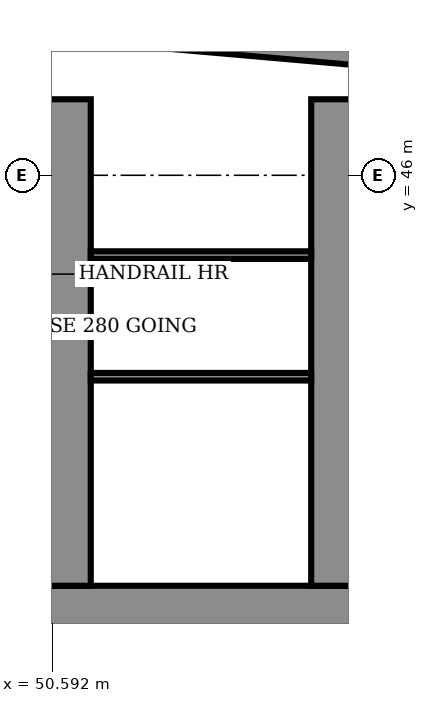
"""IFC4 building model, lengths in metres.
Left out: names, types, materials, properties, quantities, classifications, styles, units other than length and angle.
Written with IfcOpenShell. Run it as: python <this file> out.ifc"""

import sys

from ifc_helpers import new_model, si_unit, direction, frame, frame_2d, origin, place, context, subcontext, project, spatial, polyline, rectangle, outline, extrude, element, fill, save


model = new_model("IFC4")
c1 = context("Model", 3, precision=1e-05, world=origin(), true_north=direction((0.0, 1.0)))
c2 = subcontext(c1, "Body", "Model", "MODEL_VIEW")
j1 = project(units=[si_unit("LENGTHUNIT", "METRE"), si_unit("PLANEANGLEUNIT", "RADIAN")], contexts=[c1])
p1 = place(None, origin())
s1 = spatial("IfcSite", under=j1, at=p1, CompositionType="ELEMENT")
p2 = place(p1, origin())
s2 = spatial("IfcBuilding", under=s1, at=p2, CompositionType="ELEMENT")
p3 = place(p2, origin())
s3 = spatial("IfcBuildingStorey", under=s2, at=p3, CompositionType="ELEMENT", Elevation=0.0)
p4 = place(p3, frame((59.301, 49.06, 0.0), z_axis=(0.0, 0.0, 1.0), x_axis=(-0.996195, 0.087145, 0.0)))
e1 = element("IfcWall", 1, at=p4, inside=s3, PredefinedType="SOLIDWALL", context=c2, shape_type="SweptSolid", body=[
    extrude(rectangle(XDim=11.344, YDim=0.45, at=frame_2d((5.672, 0.0))), origin(), (0.0, 0.0, 1.0), 7.7),
])
p5 = place(p3, frame((9.0, 34.6, 0.0), z_axis=(0.0, 0.0, 1.0), x_axis=(1.0, 0.0, 0.0)))
e2 = element("IfcWall", 2, at=p5, inside=s3, PredefinedType="SHEAR", context=c2, shape_type="SweptSolid", body=[
    extrude(rectangle(XDim=56.0, YDim=1.2, at=frame_2d((28.0, 0.0))), origin(), (0.0, 0.0, 1.0), 7.7),
])
p6 = place(p5, frame((3.3, 0.0, 0.0)))
e3 = element("IfcOpeningElement", 3, at=p6, cuts=e2, PredefinedType="OPENING", context=c2, shape_type="SweptSolid", body=[
    extrude(rectangle(XDim=1.0, YDim=2.1, at=frame_2d((0.5, 1.05))), frame((0.0, 0.61, 0.0), z_axis=(0.0, -1.0, 0.0), x_axis=(1.0, 0.0, 0.0)), (0.0, 0.0, 1.0), 1.22),
])
p7 = place(p5, frame((7.867, 0.0, 0.0)))
e4 = element("IfcOpeningElement", 4, at=p7, cuts=e2, PredefinedType="OPENING", context=c2, shape_type="SweptSolid", body=[
    extrude(rectangle(XDim=1.1, YDim=2.1, at=frame_2d((0.55, 1.05))), frame((0.0, 0.61, 0.0), z_axis=(0.0, -1.0, 0.0), x_axis=(1.0, 0.0, 0.0)), (0.0, 0.0, 1.0), 1.22),
])
p8 = place(p5, frame((12.033, 0.0, 0.0)))
e5 = element("IfcOpeningElement", 5, at=p8, cuts=e2, PredefinedType="OPENING", context=c2, shape_type="SweptSolid", body=[
    extrude(rectangle(XDim=1.1, YDim=2.1, at=frame_2d((0.55, 1.05))), frame((0.0, 0.61, 0.0), z_axis=(0.0, -1.0, 0.0), x_axis=(1.0, 0.0, 0.0)), (0.0, 0.0, 1.0), 1.22),
])
p9 = place(p5, frame((9.8, 0.0, 0.0)))
e6 = element("IfcOpeningElement", 6, at=p9, cuts=e2, PredefinedType="OPENING", context=c2, shape_type="SweptSolid", body=[
    extrude(rectangle(XDim=1.4, YDim=2.1, at=frame_2d((0.7, 1.05))), frame((0.0, 0.61, 0.0), z_axis=(0.0, -1.0, 0.0), x_axis=(1.0, 0.0, 0.0)), (0.0, 0.0, 1.0), 1.22),
])
p10 = place(p5, frame((14.65, 0.0, 0.0)))
e7 = element("IfcOpeningElement", 7, at=p10, cuts=e2, PredefinedType="OPENING", context=c2, shape_type="SweptSolid", body=[
    extrude(rectangle(XDim=1.2, YDim=2.1, at=frame_2d((0.6, 1.05))), frame((0.0, 0.61, 0.0), z_axis=(0.0, -1.0, 0.0), x_axis=(1.0, 0.0, 0.0)), (0.0, 0.0, 1.0), 1.22),
])
p11 = place(p5, frame((21.867, 0.0, 0.0)))
e8 = element("IfcOpeningElement", 8, at=p11, cuts=e2, PredefinedType="OPENING", context=c2, shape_type="SweptSolid", body=[
    extrude(rectangle(XDim=1.1, YDim=2.1, at=frame_2d((0.55, 1.05))), frame((0.0, 0.61, 0.0), z_axis=(0.0, -1.0, 0.0), x_axis=(1.0, 0.0, 0.0)), (0.0, 0.0, 1.0), 1.22),
])
p12 = place(p5, frame((26.033, 0.0, 0.0)))
e9 = element("IfcOpeningElement", 9, at=p12, cuts=e2, PredefinedType="OPENING", context=c2, shape_type="SweptSolid", body=[
    extrude(rectangle(XDim=1.1, YDim=2.1, at=frame_2d((0.55, 1.05))), frame((0.0, 0.61, 0.0), z_axis=(0.0, -1.0, 0.0), x_axis=(1.0, 0.0, 0.0)), (0.0, 0.0, 1.0), 1.22),
])
p13 = place(p5, frame((23.8, 0.0, 0.0)))
e10 = element("IfcOpeningElement", 10, at=p13, cuts=e2, PredefinedType="OPENING", context=c2, shape_type="SweptSolid", body=[
    extrude(rectangle(XDim=1.4, YDim=2.1, at=frame_2d((0.7, 1.05))), frame((0.0, 0.61, 0.0), z_axis=(0.0, -1.0, 0.0), x_axis=(1.0, 0.0, 0.0)), (0.0, 0.0, 1.0), 1.22),
])
p14 = place(p5, frame((28.867, 0.0, 0.0)))
e11 = element("IfcOpeningElement", 11, at=p14, cuts=e2, PredefinedType="OPENING", context=c2, shape_type="SweptSolid", body=[
    extrude(rectangle(XDim=1.1, YDim=2.1, at=frame_2d((0.55, 1.05))), frame((0.0, 0.61, 0.0), z_axis=(0.0, -1.0, 0.0), x_axis=(1.0, 0.0, 0.0)), (0.0, 0.0, 1.0), 1.22),
])
p15 = place(p5, frame((33.033, 0.0, 0.0)))
e12 = element("IfcOpeningElement", 12, at=p15, cuts=e2, PredefinedType="OPENING", context=c2, shape_type="SweptSolid", body=[
    extrude(rectangle(XDim=1.1, YDim=2.1, at=frame_2d((0.55, 1.05))), frame((0.0, 0.61, 0.0), z_axis=(0.0, -1.0, 0.0), x_axis=(1.0, 0.0, 0.0)), (0.0, 0.0, 1.0), 1.22),
])
p16 = place(p5, frame((40.15, 0.0, 0.0)))
e13 = element("IfcOpeningElement", 13, at=p16, cuts=e2, PredefinedType="OPENING", context=c2, shape_type="SweptSolid", body=[
    extrude(rectangle(XDim=1.2, YDim=2.1, at=frame_2d((0.6, 1.05))), frame((0.0, 0.61, 0.0), z_axis=(0.0, -1.0, 0.0), x_axis=(1.0, 0.0, 0.0)), (0.0, 0.0, 1.0), 1.22),
])
p17 = place(p5, frame((42.867, 0.0, 0.0)))
e14 = element("IfcOpeningElement", 14, at=p17, cuts=e2, PredefinedType="OPENING", context=c2, shape_type="SweptSolid", body=[
    extrude(rectangle(XDim=1.1, YDim=2.1, at=frame_2d((0.55, 1.05))), frame((0.0, 0.61, 0.0), z_axis=(0.0, -1.0, 0.0), x_axis=(1.0, 0.0, 0.0)), (0.0, 0.0, 1.0), 1.22),
])
p18 = place(p5, frame((47.033, 0.0, 0.0)))
e15 = element("IfcOpeningElement", 15, at=p18, cuts=e2, PredefinedType="OPENING", context=c2, shape_type="SweptSolid", body=[
    extrude(rectangle(XDim=1.1, YDim=2.1, at=frame_2d((0.55, 1.05))), frame((0.0, 0.61, 0.0), z_axis=(0.0, -1.0, 0.0), x_axis=(1.0, 0.0, 0.0)), (0.0, 0.0, 1.0), 1.22),
])
p19 = place(p5, frame((44.8, 0.0, 0.0)))
e16 = element("IfcOpeningElement", 16, at=p19, cuts=e2, PredefinedType="OPENING", context=c2, shape_type="SweptSolid", body=[
    extrude(rectangle(XDim=1.4, YDim=2.1, at=frame_2d((0.7, 1.05))), frame((0.0, 0.61, 0.0), z_axis=(0.0, -1.0, 0.0), x_axis=(1.0, 0.0, 0.0)), (0.0, 0.0, 1.0), 1.22),
])
p20 = place(p5, frame((49.867, 0.0, 0.0)))
e17 = element("IfcOpeningElement", 17, at=p20, cuts=e2, PredefinedType="OPENING", context=c2, shape_type="SweptSolid", body=[
    extrude(rectangle(XDim=1.1, YDim=2.1, at=frame_2d((0.55, 1.05))), frame((0.0, 0.61, 0.0), z_axis=(0.0, -1.0, 0.0), x_axis=(1.0, 0.0, 0.0)), (0.0, 0.0, 1.0), 1.22),
])
p21 = place(p5, frame((53.5, 0.0, 0.0)))
e18 = element("IfcOpeningElement", 18, at=p21, cuts=e2, PredefinedType="OPENING", context=c2, shape_type="SweptSolid", body=[
    extrude(rectangle(XDim=1.1, YDim=2.1, at=frame_2d((0.55, 1.05))), frame((0.0, 0.61, 0.0), z_axis=(0.0, -1.0, 0.0), x_axis=(1.0, 0.0, 0.0)), (0.0, 0.0, 1.0), 1.22),
])
p22 = place(p5, frame((51.567, 0.0, 0.0)))
e19 = element("IfcOpeningElement", 19, at=p22, cuts=e2, PredefinedType="OPENING", context=c2, shape_type="SweptSolid", body=[
    extrude(rectangle(XDim=1.4, YDim=2.1, at=frame_2d((0.7, 1.05))), frame((0.0, 0.61, 0.0), z_axis=(0.0, -1.0, 0.0), x_axis=(1.0, 0.0, 0.0)), (0.0, 0.0, 1.0), 1.22),
])
p23 = place(p3, frame((51.0, 35.2, 0.0), z_axis=(0.0, 0.0, 1.0), x_axis=(0.0, 1.0, 0.0)))
e20 = element("IfcWall", 20, at=p23, inside=s3, PredefinedType="SHEAR", context=c2, shape_type="SweptSolid", body=[
    extrude(rectangle(XDim=12.8, YDim=1.2, at=frame_2d((6.4, 0.0))), origin(), (0.0, 0.0, 1.0), 7.7),
])
p24 = place(p23, frame((3.2, 0.0, 0.0)))
e21 = element("IfcOpeningElement", 21, at=p24, cuts=e20, PredefinedType="OPENING", context=c2, shape_type="SweptSolid", body=[
    extrude(rectangle(XDim=1.1, YDim=2.1, at=frame_2d((0.55, 1.05))), frame((0.0, 0.61, 0.0), z_axis=(0.0, -1.0, 0.0), x_axis=(1.0, 0.0, 0.0)), (0.0, 0.0, 1.0), 1.22),
])
p25 = place(p3, frame((58.0, 35.2, 0.0), z_axis=(0.0, 0.0, 1.0), x_axis=(0.0, 1.0, 0.0)))
e22 = element("IfcWall", 22, at=p25, inside=s3, PredefinedType="SHEAR", context=c2, shape_type="SweptSolid", body=[
    extrude(rectangle(XDim=12.8, YDim=1.2, at=frame_2d((6.4, 0.0))), origin(), (0.0, 0.0, 1.0), 7.7),
])
p26 = place(p25, frame((10.134, 0.0, 0.0)))
e23 = element("IfcOpeningElement", 23, at=p26, cuts=e22, PredefinedType="OPENING", context=c2, shape_type="SweptSolid", body=[
    extrude(rectangle(XDim=1.0, YDim=2.1, at=frame_2d((0.5, 1.05))), frame((0.0, 0.61, 0.0), z_axis=(0.0, -1.0, 0.0), x_axis=(1.0, 0.0, 0.0)), (0.0, 0.0, 1.0), 1.22),
])
p27 = place(p25, frame((3.2, 0.0, 0.0)))
e24 = element("IfcOpeningElement", 24, at=p27, cuts=e22, PredefinedType="OPENING", context=c2, shape_type="SweptSolid", body=[
    extrude(rectangle(XDim=1.1, YDim=2.1, at=frame_2d((0.55, 1.05))), frame((0.0, 0.61, 0.0), z_axis=(0.0, -1.0, 0.0), x_axis=(1.0, 0.0, 0.0)), (0.0, 0.0, 1.0), 1.22),
])
p28 = place(p3, frame((51.6, 40.7, 0.0), z_axis=(0.0, 0.0, 1.0), x_axis=(1.0, 0.0, 0.0)))
e25 = element("IfcWall", 25, at=p28, inside=s3, PredefinedType="PARTITIONING", context=c2, shape_type="SweptSolid", body=[
    extrude(rectangle(XDim=5.8, YDim=0.2, at=frame_2d((2.9, 0.0))), origin(), (0.0, 0.0, 1.0), 7.7),
])
p29 = place(p28, frame((0.317, 0.0, 0.0)))
e26 = element("IfcOpeningElement", 26, at=p29, cuts=e25, PredefinedType="OPENING", context=c2, shape_type="SweptSolid", body=[
    extrude(rectangle(XDim=1.0, YDim=2.1, at=frame_2d((0.5, 1.05))), frame((0.0, 0.11, 0.0), z_axis=(0.0, -1.0, 0.0), x_axis=(1.0, 0.0, 0.0)), (0.0, 0.0, 1.0), 0.22),
])
p30 = place(p28, frame((2.35, 0.0, 0.0)))
e27 = element("IfcOpeningElement", 27, at=p30, cuts=e25, PredefinedType="OPENING", context=c2, shape_type="SweptSolid", body=[
    extrude(rectangle(XDim=1.1, YDim=2.1, at=frame_2d((0.55, 1.05))), frame((0.0, 0.11, 0.0), z_axis=(0.0, -1.0, 0.0), x_axis=(1.0, 0.0, 0.0)), (0.0, 0.0, 1.0), 0.22),
])
p31 = place(p28, frame((4.433, 0.0, 0.0)))
e28 = element("IfcOpeningElement", 28, at=p31, cuts=e25, PredefinedType="OPENING", context=c2, shape_type="SweptSolid", body=[
    extrude(rectangle(XDim=1.1, YDim=2.1, at=frame_2d((0.55, 1.05))), frame((0.0, 0.11, 0.0), z_axis=(0.0, -1.0, 0.0), x_axis=(1.0, 0.0, 0.0)), (0.0, 0.0, 1.0), 0.22),
])
p32 = place(p3, frame((51.6, 43.9, 0.0), z_axis=(0.0, 0.0, 1.0), x_axis=(1.0, 0.0, 0.0)))
e29 = element("IfcWall", 29, at=p32, inside=s3, PredefinedType="PARTITIONING", context=c2, shape_type="SweptSolid", body=[
    extrude(rectangle(XDim=5.8, YDim=0.2, at=frame_2d((2.9, 0.0))), origin(), (0.0, 0.0, 1.0), 7.7),
])
p33 = place(p32, frame((0.317, 0.0, 0.0)))
e30 = element("IfcOpeningElement", 30, at=p33, cuts=e29, PredefinedType="OPENING", context=c2, shape_type="SweptSolid", body=[
    extrude(rectangle(XDim=1.0, YDim=2.1, at=frame_2d((0.5, 1.05))), frame((0.0, 0.11, 0.0), z_axis=(0.0, -1.0, 0.0), x_axis=(1.0, 0.0, 0.0)), (0.0, 0.0, 1.0), 0.22),
])
p34 = place(p3, frame((0.0, 0.0, -0.0)))
e31 = element("IfcWall", 31, at=p34, inside=s3, PredefinedType="PARTITIONING", context=c2, shape_type="SweptSolid", body=[
    extrude(outline(polyline([(53.233, 37.15), (51.6, 37.15), (51.6, 37.35), (53.233, 37.35), (53.433, 37.35), (53.433, 35.2), (53.233, 35.2), (53.233, 37.15)])), origin(), (0.0, 0.0, 1.0), 7.7),
])
p35 = place(p3, frame((0.0, 0.0, -0.0)))
e32 = element("IfcWall", 32, at=p35, inside=s3, PredefinedType="PARTITIONING", context=c2, shape_type="SweptSolid", body=[
    extrude(outline(polyline([(55.567, 37.35), (55.767, 37.35), (57.4, 37.35), (57.4, 37.15), (55.767, 37.15), (55.767, 35.2), (55.567, 35.2), (55.567, 37.35)])), origin(), (0.0, 0.0, 1.0), 7.7),
])
p36 = place(p3, frame((0.0, 0.0, -0.0)))
e33 = element("IfcWall", 33, at=p36, inside=s3, PredefinedType="PARTITIONING", context=c2, shape_type="SweptSolid", body=[
    extrude(outline(polyline([(53.233, 40.8), (53.233, 43.8), (53.433, 43.8), (53.433, 40.8), (53.233, 40.8)])), origin(), (0.0, 0.0, 1.0), 7.7),
])
p37 = place(p3, frame((0.0, 0.0, -0.0)))
e34 = element("IfcWall", 34, at=p37, inside=s3, PredefinedType="PARTITIONING", context=c2, shape_type="SweptSolid", body=[
    extrude(outline(polyline([(55.567, 40.8), (55.567, 43.8), (55.767, 43.8), (55.767, 40.8), (55.567, 40.8)])), origin(), (0.0, 0.0, 1.0), 7.7),
])
p38 = place(p17, origin())
e35 = element("IfcDoor", 35, at=p38, inside=s3, OperationType="DOUBLE_DOOR_SLIDING", PredefinedType="DOOR", context=c2, shape_type="SweptSolid", body=[
    extrude(rectangle(XDim=1.1, YDim=2.1, at=frame_2d((0.55, 1.05))), frame((0.0, 0.025, 0.0), z_axis=(0.0, -1.0, 0.0), x_axis=(1.0, 0.0, 0.0)), (0.0, 0.0, 1.0), 0.05),
])
fill(e14, e35)
p39 = place(p18, origin())
e36 = element("IfcDoor", 36, at=p39, inside=s3, OperationType="DOUBLE_DOOR_SLIDING", PredefinedType="DOOR", context=c2, shape_type="SweptSolid", body=[
    extrude(rectangle(XDim=1.1, YDim=2.1, at=frame_2d((0.55, 1.05))), frame((0.0, 0.025, 0.0), z_axis=(0.0, -1.0, 0.0), x_axis=(1.0, 0.0, 0.0)), (0.0, 0.0, 1.0), 0.05),
])
fill(e15, e36)
p40 = place(p19, origin())
e37 = element("IfcDoor", 37, at=p40, inside=s3, OperationType="DOUBLE_DOOR_SINGLE_SWING", PredefinedType="DOOR", context=c2, shape_type="SweptSolid", body=[
    extrude(rectangle(XDim=1.4, YDim=2.1, at=frame_2d((0.7, 1.05))), frame((0.0, 0.025, 0.0), z_axis=(0.0, -1.0, 0.0), x_axis=(1.0, 0.0, 0.0)), (0.0, 0.0, 1.0), 0.05),
])
fill(e16, e37)
p41 = place(p29, origin())
e38 = element("IfcDoor", 38, at=p41, inside=s3, OperationType="SINGLE_SWING_RIGHT", PredefinedType="DOOR", context=c2, shape_type="SweptSolid", body=[
    extrude(rectangle(XDim=1.0, YDim=2.1, at=frame_2d((0.5, 1.05))), frame((0.0, 0.025, 0.0), z_axis=(0.0, -1.0, 0.0), x_axis=(1.0, 0.0, 0.0)), (0.0, 0.0, 1.0), 0.05),
])
fill(e26, e38)
p42 = place(p30, origin())
e39 = element("IfcDoor", 39, at=p42, inside=s3, OperationType="DOUBLE_DOOR_SLIDING", PredefinedType="DOOR", context=c2, shape_type="SweptSolid", body=[
    extrude(rectangle(XDim=1.1, YDim=2.1, at=frame_2d((0.55, 1.05))), frame((0.0, 0.025, 0.0), z_axis=(0.0, -1.0, 0.0), x_axis=(1.0, 0.0, 0.0)), (0.0, 0.0, 1.0), 0.05),
])
fill(e27, e39)
p43 = place(p31, origin())
e40 = element("IfcDoor", 40, at=p43, inside=s3, OperationType="DOUBLE_DOOR_SLIDING", PredefinedType="DOOR", context=c2, shape_type="SweptSolid", body=[
    extrude(rectangle(XDim=1.1, YDim=2.1, at=frame_2d((0.55, 1.05))), frame((0.0, 0.025, 0.0), z_axis=(0.0, -1.0, 0.0), x_axis=(1.0, 0.0, 0.0)), (0.0, 0.0, 1.0), 0.05),
])
fill(e28, e40)
p44 = place(p33, origin())
e41 = element("IfcDoor", 41, at=p44, inside=s3, OperationType="SINGLE_SWING_LEFT", PredefinedType="DOOR", context=c2, shape_type="SweptSolid", body=[
    extrude(rectangle(XDim=1.0, YDim=2.1, at=frame_2d((0.5, 1.05))), frame((0.0, 0.025, 0.0), z_axis=(0.0, -1.0, 0.0), x_axis=(1.0, 0.0, 0.0)), (0.0, 0.0, 1.0), 0.05),
])
fill(e30, e41)
p45 = place(p26, origin())
e42 = element("IfcDoor", 42, at=p45, inside=s3, OperationType="SINGLE_SWING_LEFT", PredefinedType="DOOR", context=c2, shape_type="SweptSolid", body=[
    extrude(rectangle(XDim=1.0, YDim=2.1, at=frame_2d((0.5, 1.05))), frame((0.0, 0.6, 0.0), z_axis=(0.0, -1.0, 0.0), x_axis=(1.0, 0.0, 0.0)), (0.0, 0.0, 1.0), 1.199),
])
fill(e23, e42)
p46 = place(p24, origin())
e43 = element("IfcDoor", 43, at=p46, inside=s3, OperationType="SINGLE_SWING_RIGHT", PredefinedType="DOOR", context=c2, shape_type="SweptSolid", body=[
    extrude(rectangle(XDim=1.1, YDim=2.1, at=frame_2d((0.55, 1.05))), frame((0.0, 0.025, 0.0), z_axis=(0.0, -1.0, 0.0), x_axis=(1.0, 0.0, 0.0)), (0.0, 0.0, 1.0), 0.05),
])
fill(e21, e43)
p47 = place(p27, origin())
e44 = element("IfcDoor", 44, at=p47, inside=s3, OperationType="SINGLE_SWING_LEFT", PredefinedType="DOOR", context=c2, shape_type="SweptSolid", body=[
    extrude(rectangle(XDim=1.1, YDim=2.1, at=frame_2d((0.55, 1.05))), frame((0.0, 0.025, 0.0), z_axis=(0.0, -1.0, 0.0), x_axis=(1.0, 0.0, 0.0)), (0.0, 0.0, 1.0), 0.05),
])
fill(e24, e44)
save(model, sys.argv[1])
